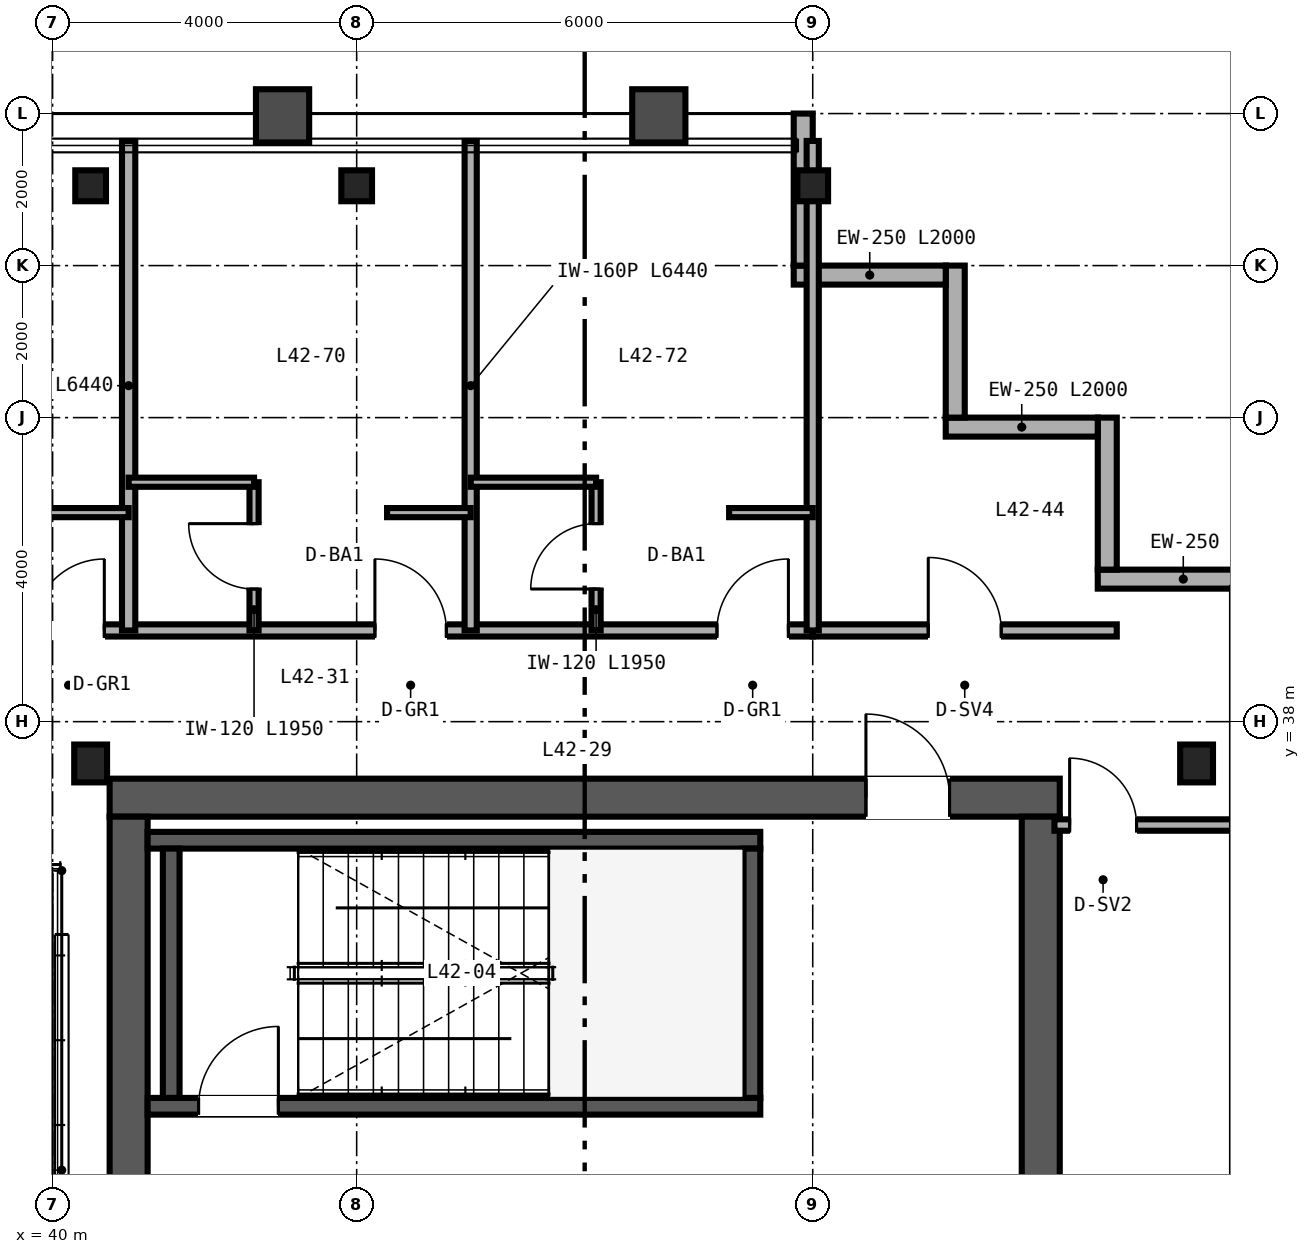
"""IFC4 building model, lengths in metres.
Left out: names, types, materials, properties, quantities, classifications, styles, units other than length and angle.
Written with IfcOpenShell. Run it as: python <this file> out.ifc"""

import sys

from ifc_helpers import new_model, si_unit, direction, frame, frame_2d, origin, origin_2d, place, context, subcontext, project, spatial, rectangle, i_section, extrude, source, transform, mapped, element, fill, save


model = new_model("IFC4")
c1 = context("Model", 3, precision=1e-05, world=origin(), true_north=direction((0.0, 1.0)))
c2 = subcontext(c1, "Body", "Model", "MODEL_VIEW")
j1 = project(units=[si_unit("LENGTHUNIT", "METRE"), si_unit("PLANEANGLEUNIT", "RADIAN")], contexts=[c1])
p1 = place(None, origin())
s1 = spatial("IfcSite", under=j1, at=p1, CompositionType="ELEMENT")
p2 = place(p1, origin())
s2 = spatial("IfcBuilding", under=s1, at=p2, CompositionType="ELEMENT")
p3 = place(p2, frame((0.0, 0.0, 170.4)))
s3 = spatial("IfcBuildingStorey", under=s2, at=p3, CompositionType="ELEMENT", Elevation=170.4)
p4 = place(p3, frame((40.75, 37.0, 0.0), z_axis=(0.0, 0.0, 1.0), x_axis=(1.0, 0.0, 0.0)))
e1 = element("IfcWall", 1, at=p4, inside=s3, PredefinedType="SHEAR", context=c2, shape_type="SweptSolid", body=[
    extrude(rectangle(XDim=12.5, YDim=0.5, at=frame_2d((6.25, 0.0))), origin(), (0.0, 0.0, 1.0), 3.37),
])
p5 = place(p4, frame((9.95, 0.0, 0.0)))
e2 = element("IfcOpeningElement", 2, at=p5, cuts=e1, PredefinedType="OPENING", context=c2, shape_type="SweptSolid", body=[
    extrude(rectangle(XDim=1.1, YDim=2.15, at=frame_2d((0.55, 1.075))), frame((0.0, 0.26, 0.0), z_axis=(0.0, -1.0, 0.0), x_axis=(1.0, 0.0, 0.0)), (0.0, 0.0, 1.0), 0.52),
])
for number, where, z_axis, x_axis in (
    (3, (41.0, 15.25, 0.0), (0.0, 0.0, 1.0), (0.0, 1.0, 0.0)),
    (4, (53.0, 15.25, 0.0), (0.0, 0.0, 1.0), (0.0, 1.0, 0.0)),
):
    element("IfcWall", number, at=place(p3, frame(where, z_axis=z_axis, x_axis=x_axis)), inside=s3, PredefinedType="SHEAR", context=c2, shape_type="SweptSolid", body=[
        extrude(rectangle(XDim=21.5, YDim=0.5, at=frame_2d((10.75, 0.0))), origin(), (0.0, 0.0, 1.0), 3.37),
    ])
p6 = place(p3, frame((41.25, 32.94, 0.0), z_axis=(0.0, 0.0, 1.0), x_axis=(1.0, 0.0, 0.0)))
e5 = element("IfcWall", 5, at=p6, inside=s3, PredefinedType="SHEAR", context=c2, shape_type="SweptSolid", body=[
    extrude(rectangle(XDim=8.06, YDim=0.22, at=frame_2d((4.03, 0.0))), origin(), (0.0, 0.0, 1.0), 3.4),
])
p7 = place(p6, frame((0.67, 0.0, 0.0)))
e6 = element("IfcOpeningElement", 6, at=p7, cuts=e5, PredefinedType="OPENING", context=c2, shape_type="SweptSolid", body=[
    extrude(rectangle(XDim=1.05, YDim=2.15, at=frame_2d((0.525, 1.075))), frame((0.0, 0.12, 0.0), z_axis=(0.0, -1.0, 0.0), x_axis=(1.0, 0.0, 0.0)), (0.0, 0.0, 1.0), 0.24),
])
p8 = place(p3, frame((41.25, 36.44, 0.0), z_axis=(0.0, 0.0, 1.0), x_axis=(1.0, 0.0, 0.0)))
e7 = element("IfcWall", 7, at=p8, inside=s3, PredefinedType="SHEAR", context=c2, shape_type="SweptSolid", body=[
    extrude(rectangle(XDim=8.06, YDim=0.22, at=frame_2d((4.03, 0.0))), origin(), (0.0, 0.0, 1.0), 3.4),
])
for number, where, z_axis, x_axis in (
    (8, (41.56, 33.05, 0.0), (0.0, 0.0, 1.0), (0.0, 1.0, 0.0)),
    (9, (49.2, 33.05, 0.0), (0.0, 0.0, 1.0), (0.0, 1.0, 0.0)),
):
    element("IfcWall", number, at=place(p3, frame(where, z_axis=z_axis, x_axis=x_axis)), inside=s3, PredefinedType="SHEAR", context=c2, shape_type="SweptSolid", body=[
        extrude(rectangle(XDim=3.28, YDim=0.22, at=frame_2d((1.64, 0.0))), origin(), (0.0, 0.0, 1.0), 3.4),
    ])
m1 = source(origin(), c2, "Body", "SweptSolid", [
    extrude(i_section(OverallWidth=0.432, OverallDepth=0.498, WebThickness=0.056, FlangeThickness=0.089, FilletRadius=0.025, at=origin_2d()), origin(), (0.0, 0.0, 1.0), 3.37),
])
for number, where, z_axis, x_axis in (
    (10, (40.5, 37.45, 0.0), (0.0, 0.0, 1.0), (1.0, 0.0, 0.0)),
    (11, (55.05, 37.45, 0.0), (0.0, 0.0, 1.0), (1.0, 0.0, 0.0)),
):
    element("IfcColumn", number, at=place(p3, frame(where, z_axis=z_axis, x_axis=x_axis)), inside=s3, PredefinedType="COLUMN", context=c2, shape_type="MappedRepresentation", body=[
        mapped(m1, transform((0.0, 0.0, 0.0), scale=1.0)),
    ])
m2 = source(origin(), c2, "Body", "SweptSolid", [
    extrude(i_section(OverallWidth=0.404, OverallDepth=0.407, WebThickness=0.027, FlangeThickness=0.044, FilletRadius=0.025, at=origin_2d()), origin(), (0.0, 0.0, 1.0), 3.37),
])
for number, where, z_axis, x_axis in (
    (12, (40.5, 45.05, 0.0), (0.0, 0.0, 1.0), (1.0, 0.0, 0.0)),
    (13, (44.0, 45.05, 0.0), (0.0, 0.0, 1.0), (1.0, 0.0, 0.0)),
    (14, (50.0, 45.05, 0.0), (0.0, 0.0, 1.0), (1.0, 0.0, 0.0)),
):
    element("IfcColumn", number, at=place(p3, frame(where, z_axis=z_axis, x_axis=x_axis)), inside=s3, PredefinedType="COLUMN", context=c2, shape_type="MappedRepresentation", body=[
        mapped(m2, transform((0.0, 0.0, 0.0), scale=1.0)),
    ])
p9 = place(p3, frame((56.0, 39.875, 0.0), z_axis=(0.0, 0.0, 1.0), x_axis=(-1.0, 0.0, 0.0)))
e15 = element("IfcWall", 15, at=p9, inside=s3, PredefinedType="SOLIDWALL", context=c2, shape_type="SweptSolid", body=[
    extrude(rectangle(XDim=2.25, YDim=0.25, at=frame_2d((1.125, 0.0))), origin(), (0.0, 0.0, 1.0), 3.37),
])
for number, where, z_axis, x_axis in (
    (16, (53.875, 40.0, 0.0), (0.0, 0.0, 1.0), (0.0, 1.0, 0.0)),
    (17, (53.75, 41.875, 0.0), (0.0, 0.0, 1.0), (-1.0, 0.0, 0.0)),
    (18, (51.875, 42.0, 0.0), (0.0, 0.0, 1.0), (0.0, 1.0, 0.0)),
    (19, (51.75, 43.875, 0.0), (0.0, 0.0, 1.0), (-1.0, 0.0, 0.0)),
):
    element("IfcWall", number, at=place(p3, frame(where, z_axis=z_axis, x_axis=x_axis)), inside=s3, PredefinedType="SOLIDWALL", context=c2, shape_type="SweptSolid", body=[
        extrude(rectangle(XDim=2.0, YDim=0.25, at=frame_2d((1.0, 0.0))), origin(), (0.0, 0.0, 1.0), 3.37),
    ])
p10 = place(p3, frame((49.875, 44.0, 0.0), z_axis=(0.0, 0.0, 1.0), x_axis=(0.0, 1.0, 0.0)))
e20 = element("IfcWall", 20, at=p10, inside=s3, PredefinedType="SOLIDWALL", context=c2, shape_type="SweptSolid", body=[
    extrude(rectangle(XDim=2.0, YDim=0.25, at=frame_2d((1.0, 0.0))), origin(), (0.0, 0.0, 1.0), 2.677),
])
p11 = place(p3, frame((53.18, 36.64, 0.0), z_axis=(0.0, 0.0, 1.0), x_axis=(1.0, 0.0, 0.0)))
e21 = element("IfcWall", 21, at=p11, inside=s3, PredefinedType="PARTITIONING", context=c2, shape_type="SweptSolid", body=[
    extrude(rectangle(XDim=2.66, YDim=0.15, at=frame_2d((1.33, 0.0))), origin(), (0.0, 0.0, 1.0), 2.753),
])
p12 = place(p11, frame((0.2, 0.0, 0.0)))
e22 = element("IfcOpeningElement", 22, at=p12, cuts=e21, PredefinedType="OPENING", context=c2, shape_type="SweptSolid", body=[
    extrude(rectangle(XDim=0.88, YDim=2.15, at=frame_2d((0.44, 1.075))), frame((0.0, 0.085, 0.0), z_axis=(0.0, -1.0, 0.0), x_axis=(1.0, 0.0, 0.0)), (0.0, 0.0, 1.0), 0.17),
])
p13 = place(p3, frame((50.0, 39.2, 0.0), z_axis=(0.0, 0.0, 1.0), x_axis=(1.0, 0.0, 0.0)))
e23 = element("IfcWall", 23, at=p13, inside=s3, PredefinedType="PARTITIONING", context=c2, shape_type="SweptSolid", body=[
    extrude(rectangle(XDim=4.0, YDim=0.16, at=frame_2d((2.0, 0.0))), origin(), (0.0, 0.0, 1.0), 3.37),
])
p14 = place(p13, frame((1.52, 0.0, 0.0)))
e24 = element("IfcOpeningElement", 24, at=p14, cuts=e23, PredefinedType="OPENING", context=c2, shape_type="SweptSolid", body=[
    extrude(rectangle(XDim=0.96, YDim=2.15, at=frame_2d((0.48, 1.075))), frame((0.0, 0.09, 0.0), z_axis=(0.0, -1.0, 0.0), x_axis=(1.0, 0.0, 0.0)), (0.0, 0.0, 1.0), 0.18),
])
p15 = place(p3, frame((14.0, 39.2, 0.0), z_axis=(0.0, 0.0, 1.0), x_axis=(1.0, 0.0, 0.0)))
e25 = element("IfcWall", 25, at=p15, inside=s3, PredefinedType="PARTITIONING", context=c2, shape_type="SweptSolid", body=[
    extrude(rectangle(XDim=36.0, YDim=0.16, at=frame_2d((18.0, 0.0))), origin(), (0.0, 0.0, 1.0), 2.913),
])
p16 = place(p15, frame((3.14, 0.0, 0.0)))
e26 = element("IfcOpeningElement", 26, at=p16, cuts=e25, PredefinedType="OPENING", context=c2, shape_type="SweptSolid", body=[
    extrude(rectangle(XDim=0.94, YDim=2.15, at=frame_2d((0.47, 1.075))), frame((0.0, 0.09, 0.0), z_axis=(0.0, -1.0, 0.0), x_axis=(1.0, 0.0, 0.0)), (0.0, 0.0, 1.0), 0.18),
])
p17 = place(p15, frame((7.54, 0.0, 0.0)))
e27 = element("IfcOpeningElement", 27, at=p17, cuts=e25, PredefinedType="OPENING", context=c2, shape_type="SweptSolid", body=[
    extrude(rectangle(XDim=0.94, YDim=2.15, at=frame_2d((0.47, 1.075))), frame((0.0, 0.09, 0.0), z_axis=(0.0, -1.0, 0.0), x_axis=(1.0, 0.0, 0.0)), (0.0, 0.0, 1.0), 0.18),
])
p18 = place(p15, frame((11.94, 0.0, 0.0)))
e28 = element("IfcOpeningElement", 28, at=p18, cuts=e25, PredefinedType="OPENING", context=c2, shape_type="SweptSolid", body=[
    extrude(rectangle(XDim=0.94, YDim=2.15, at=frame_2d((0.47, 1.075))), frame((0.0, 0.09, 0.0), z_axis=(0.0, -1.0, 0.0), x_axis=(1.0, 0.0, 0.0)), (0.0, 0.0, 1.0), 0.18),
])
p19 = place(p15, frame((16.34, 0.0, 0.0)))
e29 = element("IfcOpeningElement", 29, at=p19, cuts=e25, PredefinedType="OPENING", context=c2, shape_type="SweptSolid", body=[
    extrude(rectangle(XDim=0.94, YDim=2.15, at=frame_2d((0.47, 1.075))), frame((0.0, 0.09, 0.0), z_axis=(0.0, -1.0, 0.0), x_axis=(1.0, 0.0, 0.0)), (0.0, 0.0, 1.0), 0.18),
])
p20 = place(p15, frame((20.94, 0.0, 0.0)))
e30 = element("IfcOpeningElement", 30, at=p20, cuts=e25, PredefinedType="OPENING", context=c2, shape_type="SweptSolid", body=[
    extrude(rectangle(XDim=0.94, YDim=2.15, at=frame_2d((0.47, 1.075))), frame((0.0, 0.09, 0.0), z_axis=(0.0, -1.0, 0.0), x_axis=(1.0, 0.0, 0.0)), (0.0, 0.0, 1.0), 0.18),
])
p21 = place(p15, frame((25.74, 0.0, 0.0)))
e31 = element("IfcOpeningElement", 31, at=p21, cuts=e25, PredefinedType="OPENING", context=c2, shape_type="SweptSolid", body=[
    extrude(rectangle(XDim=0.94, YDim=2.15, at=frame_2d((0.47, 1.075))), frame((0.0, 0.09, 0.0), z_axis=(0.0, -1.0, 0.0), x_axis=(1.0, 0.0, 0.0)), (0.0, 0.0, 1.0), 0.18),
])
p22 = place(p15, frame((30.24, 0.0, 0.0)))
e32 = element("IfcOpeningElement", 32, at=p22, cuts=e25, PredefinedType="OPENING", context=c2, shape_type="SweptSolid", body=[
    extrude(rectangle(XDim=0.94, YDim=2.15, at=frame_2d((0.47, 1.075))), frame((0.0, 0.09, 0.0), z_axis=(0.0, -1.0, 0.0), x_axis=(1.0, 0.0, 0.0)), (0.0, 0.0, 1.0), 0.18),
])
p23 = place(p15, frame((34.74, 0.0, 0.0)))
e33 = element("IfcOpeningElement", 33, at=p23, cuts=e25, PredefinedType="OPENING", context=c2, shape_type="SweptSolid", body=[
    extrude(rectangle(XDim=0.94, YDim=2.15, at=frame_2d((0.47, 1.075))), frame((0.0, 0.09, 0.0), z_axis=(0.0, -1.0, 0.0), x_axis=(1.0, 0.0, 0.0)), (0.0, 0.0, 1.0), 0.18),
])
p24 = place(p3, frame((50.0, 39.2, 0.0), z_axis=(0.0, 0.0, 1.0), x_axis=(0.0, 1.0, 0.0)))
e34 = element("IfcWall", 34, at=p24, inside=s3, PredefinedType="PARTITIONING", context=c2, shape_type="SweptSolid", body=[
    extrude(rectangle(XDim=6.44, YDim=0.16, at=frame_2d((3.22, 0.0))), origin(), (0.0, 0.0, 1.0), 2.677),
])
p25 = place(p3, frame((41.0, 39.2, 0.0), z_axis=(0.0, 0.0, 1.0), x_axis=(0.0, 1.0, 0.0)))
e35 = element("IfcWall", 35, at=p25, inside=s3, PredefinedType="PARTITIONING", context=c2, shape_type="SweptSolid", body=[
    extrude(rectangle(XDim=6.44, YDim=0.175, at=frame_2d((3.22, 0.0))), origin(), (0.0, 0.0, 1.0), 2.833),
])
p26 = place(p3, frame((39.9, 40.75, 0.0), z_axis=(0.0, 0.0, 1.0), x_axis=(1.0, 0.0, 0.0)))
e36 = element("IfcWall", 36, at=p26, inside=s3, PredefinedType="PARTITIONING", context=c2, shape_type="SweptSolid", body=[
    extrude(rectangle(XDim=1.1, YDim=0.12, at=frame_2d((0.55, 0.0))), origin(), (0.0, 0.0, 1.0), 2.913),
])
p27 = place(p3, frame((45.5, 39.2, 0.0), z_axis=(0.0, 0.0, 1.0), x_axis=(0.0, 1.0, 0.0)))
e37 = element("IfcWall", 37, at=p27, inside=s3, PredefinedType="PARTITIONING", context=c2, shape_type="SweptSolid", body=[
    extrude(rectangle(XDim=6.44, YDim=0.16, at=frame_2d((3.22, 0.0))), origin(), (0.0, 0.0, 1.0), 2.677),
])
p28 = place(p3, frame((42.65, 39.2, 0.0), z_axis=(0.0, 0.0, 1.0), x_axis=(0.0, 1.0, 0.0)))
e38 = element("IfcWall", 38, at=p28, inside=s3, PredefinedType="PARTITIONING", context=c2, shape_type="SweptSolid", body=[
    extrude(rectangle(XDim=1.95, YDim=0.12, at=frame_2d((0.975, 0.0))), origin(), (0.0, 0.0, 1.0), 3.37),
])
p29 = place(p28, frame((0.545, 0.0, 0.0)))
e39 = element("IfcOpeningElement", 39, at=p29, cuts=e38, PredefinedType="OPENING", context=c2, shape_type="SweptSolid", body=[
    extrude(rectangle(XDim=0.86, YDim=2.1, at=frame_2d((0.43, 1.05))), frame((0.0, 0.07, 0.0), z_axis=(0.0, -1.0, 0.0), x_axis=(1.0, 0.0, 0.0)), (0.0, 0.0, 1.0), 0.14),
])
p30 = place(p3, frame((41.0, 41.15, 0.0), z_axis=(0.0, 0.0, 1.0), x_axis=(1.0, 0.0, 0.0)))
e40 = element("IfcWall", 40, at=p30, inside=s3, PredefinedType="PARTITIONING", context=c2, shape_type="SweptSolid", body=[
    extrude(rectangle(XDim=1.65, YDim=0.12, at=frame_2d((0.825, 0.0))), origin(), (0.0, 0.0, 1.0), 3.37),
])
p31 = place(p3, frame((44.4, 40.75, 0.0), z_axis=(0.0, 0.0, 1.0), x_axis=(1.0, 0.0, 0.0)))
e41 = element("IfcWall", 41, at=p31, inside=s3, PredefinedType="PARTITIONING", context=c2, shape_type="SweptSolid", body=[
    extrude(rectangle(XDim=1.1, YDim=0.12, at=frame_2d((0.55, 0.0))), origin(), (0.0, 0.0, 1.0), 3.37),
])
p32 = place(p3, frame((47.15, 39.2, 0.0), z_axis=(0.0, 0.0, 1.0), x_axis=(0.0, 1.0, 0.0)))
e42 = element("IfcWall", 42, at=p32, inside=s3, PredefinedType="PARTITIONING", context=c2, shape_type="SweptSolid", body=[
    extrude(rectangle(XDim=1.95, YDim=0.12, at=frame_2d((0.975, 0.0))), origin(), (0.0, 0.0, 1.0), 3.37),
])
p33 = place(p32, frame((0.545, 0.0, 0.0)))
e43 = element("IfcOpeningElement", 43, at=p33, cuts=e42, PredefinedType="OPENING", context=c2, shape_type="SweptSolid", body=[
    extrude(rectangle(XDim=0.86, YDim=2.1, at=frame_2d((0.43, 1.05))), frame((0.0, 0.07, 0.0), z_axis=(0.0, -1.0, 0.0), x_axis=(1.0, 0.0, 0.0)), (0.0, 0.0, 1.0), 0.14),
])
p34 = place(p3, frame((45.5, 41.15, 0.0), z_axis=(0.0, 0.0, 1.0), x_axis=(1.0, 0.0, 0.0)))
e44 = element("IfcWall", 44, at=p34, inside=s3, PredefinedType="PARTITIONING", context=c2, shape_type="SweptSolid", body=[
    extrude(rectangle(XDim=1.65, YDim=0.12, at=frame_2d((0.825, 0.0))), origin(), (0.0, 0.0, 1.0), 3.37),
])
p35 = place(p3, frame((48.9, 40.75, 0.0), z_axis=(0.0, 0.0, 1.0), x_axis=(1.0, 0.0, 0.0)))
e45 = element("IfcWall", 45, at=p35, inside=s3, PredefinedType="PARTITIONING", context=c2, shape_type="SweptSolid", body=[
    extrude(rectangle(XDim=1.1, YDim=0.12, at=frame_2d((0.55, 0.0))), origin(), (0.0, 0.0, 1.0), 3.37),
])
m3 = source(origin(), c2, "Body", "SweptSolid", [
    extrude(rectangle(XDim=1.05, YDim=2.15, at=frame_2d((0.525, 1.075))), frame((0.0, 0.025, 0.0), z_axis=(0.0, -1.0, 0.0), x_axis=(1.0, 0.0, 0.0)), (0.0, 0.0, 1.0), 0.05),
])
p36 = place(p7, origin())
e46 = element("IfcDoor", 46, at=p36, inside=s3, OperationType="SINGLE_SWING_RIGHT", PredefinedType="DOOR", context=c2, shape_type="MappedRepresentation", body=[
    mapped(m3, transform((0.0, 0.0, 0.0), scale=1.0)),
])
fill(e6, e46)
m4 = source(origin(), c2, "Body", "SweptSolid", [
    extrude(rectangle(XDim=1.1, YDim=2.15, at=frame_2d((0.55, 1.075))), frame((0.0, 0.025, 0.0), z_axis=(0.0, -1.0, 0.0), x_axis=(1.0, 0.0, 0.0)), (0.0, 0.0, 1.0), 0.05),
])
p37 = place(p5, origin())
e47 = element("IfcDoor", 47, at=p37, inside=s3, OperationType="SINGLE_SWING_LEFT", PredefinedType="DOOR", context=c2, shape_type="MappedRepresentation", body=[
    mapped(m4, transform((0.0, 0.0, 0.0), scale=1.0)),
])
fill(e2, e47)
m5 = source(origin(), c2, "Body", "SweptSolid", [
    extrude(rectangle(XDim=0.88, YDim=2.15, at=frame_2d((0.44, 1.075))), frame((0.0, 0.025, 0.0), z_axis=(0.0, -1.0, 0.0), x_axis=(1.0, 0.0, 0.0)), (0.0, 0.0, 1.0), 0.05),
])
p38 = place(p12, origin())
e48 = element("IfcDoor", 48, at=p38, inside=s3, OperationType="SINGLE_SWING_LEFT", PredefinedType="DOOR", context=c2, shape_type="MappedRepresentation", body=[
    mapped(m5, transform((0.0, 0.0, 0.0), scale=1.0)),
])
fill(e22, e48)
m6 = source(origin(), c2, "Body", "SweptSolid", [
    extrude(rectangle(XDim=0.96, YDim=2.15, at=frame_2d((0.48, 1.075))), frame((0.0, 0.025, 0.0), z_axis=(0.0, -1.0, 0.0), x_axis=(1.0, 0.0, 0.0)), (0.0, 0.0, 1.0), 0.05),
])
p39 = place(p14, origin())
e49 = element("IfcDoor", 49, at=p39, inside=s3, OperationType="SINGLE_SWING_LEFT", PredefinedType="DOOR", context=c2, shape_type="MappedRepresentation", body=[
    mapped(m6, transform((0.0, 0.0, 0.0), scale=1.0)),
])
fill(e24, e49)
m7 = source(origin(), c2, "Body", "SweptSolid", [
    extrude(rectangle(XDim=0.86, YDim=2.1, at=frame_2d((0.43, 1.05))), frame((0.0, 0.025, 0.0), z_axis=(0.0, -1.0, 0.0), x_axis=(1.0, 0.0, 0.0)), (0.0, 0.0, 1.0), 0.05),
])
p40 = place(p29, origin())
e50 = element("IfcDoor", 50, at=p40, inside=s3, OperationType="SINGLE_SWING_RIGHT", PredefinedType="DOOR", context=c2, shape_type="MappedRepresentation", body=[
    mapped(m7, transform((0.0, 0.0, 0.0), scale=1.0)),
])
fill(e39, e50)
p41 = place(p33, origin())
e51 = element("IfcDoor", 51, at=p41, inside=s3, OperationType="SINGLE_SWING_LEFT", PredefinedType="DOOR", context=c2, shape_type="MappedRepresentation", body=[
    mapped(m7, transform((0.0, 0.0, 0.0), scale=1.0)),
])
fill(e43, e51)
m8 = source(origin(), c2, "Body", "SweptSolid", [
    extrude(rectangle(XDim=0.94, YDim=2.15, at=frame_2d((0.47, 1.075))), frame((0.0, 0.025, 0.0), z_axis=(0.0, -1.0, 0.0), x_axis=(1.0, 0.0, 0.0)), (0.0, 0.0, 1.0), 0.05),
])
p42 = place(p21, origin())
e52 = element("IfcDoor", 52, at=p42, inside=s3, OperationType="SINGLE_SWING_RIGHT", PredefinedType="DOOR", context=c2, shape_type="MappedRepresentation", body=[
    mapped(m8, transform((0.0, 0.0, 0.0), scale=1.0)),
])
fill(e31, e52)
p43 = place(p22, origin())
e53 = element("IfcDoor", 53, at=p43, inside=s3, OperationType="SINGLE_SWING_LEFT", PredefinedType="DOOR", context=c2, shape_type="MappedRepresentation", body=[
    mapped(m8, transform((0.0, 0.0, 0.0), scale=1.0)),
])
fill(e32, e53)
p44 = place(p23, origin())
e54 = element("IfcDoor", 54, at=p44, inside=s3, OperationType="SINGLE_SWING_RIGHT", PredefinedType="DOOR", context=c2, shape_type="MappedRepresentation", body=[
    mapped(m8, transform((0.0, 0.0, 0.0), scale=1.0)),
])
fill(e33, e54)
save(model, sys.argv[1])
